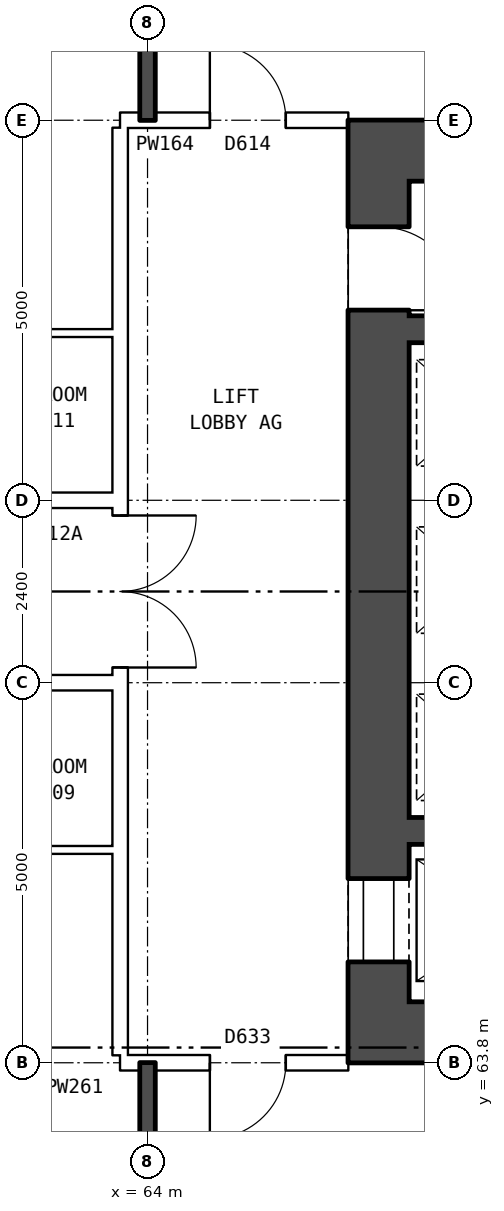
"""IFC4 building model, lengths in metres.
Left out: names, types, materials, properties, quantities, classifications, styles, units other than length and angle.
Written with IfcOpenShell. Run it as: python <this file> out.ifc"""

import sys

from ifc_helpers import new_model, si_unit, direction, frame, frame_2d, origin, place, context, subcontext, project, spatial, rectangle, extrude, element, fill, save


model = new_model("IFC4")
c1 = context("Model", 3, precision=1e-05, world=origin(), true_north=direction((0.0, 1.0)))
c2 = subcontext(c1, "Body", "Model", "MODEL_VIEW")
j1 = project(units=[si_unit("LENGTHUNIT", "METRE"), si_unit("PLANEANGLEUNIT", "RADIAN")], contexts=[c1])
p1 = place(None, origin())
s1 = spatial("IfcSite", under=j1, at=p1, CompositionType="ELEMENT")
p2 = place(p1, origin())
s2 = spatial("IfcBuilding", under=s1, at=p2, CompositionType="ELEMENT")
p3 = place(p2, frame((0.0, 0.0, 47.4)))
s3 = spatial("IfcBuildingStorey", under=s2, at=p3, CompositionType="ELEMENT", Elevation=47.4)
p4 = place(p3, frame((67.04, 64.6, 0.0), z_axis=(0.0, 0.0, 1.0), x_axis=(0.0, 1.0, 0.0)))
e1 = element("IfcWall", 1, at=p4, inside=s3, PredefinedType="SHEAR", context=c2, shape_type="SweptSolid", body=[
    extrude(rectangle(XDim=10.8, YDim=0.8, at=frame_2d((5.4, 0.0))), origin(), (0.0, 0.0, 1.0), 2.85),
])
p5 = place(p4, frame((0.525, 0.0, 0.0)))
e2 = element("IfcOpeningElement", 2, at=p5, cuts=e1, PredefinedType="OPENING", context=c2, shape_type="SweptSolid", body=[
    extrude(rectangle(XDim=1.1, YDim=2.1, at=frame_2d((0.55, 1.05))), frame((0.0, 0.41, 0.0), z_axis=(0.0, -1.0, 0.0), x_axis=(1.0, 0.0, 0.0)), (0.0, 0.0, 1.0), 0.82),
])
p6 = place(p4, frame((9.1, 0.0, 0.0)))
e3 = element("IfcOpeningElement", 3, at=p6, cuts=e1, PredefinedType="OPENING", context=c2, shape_type="SweptSolid", body=[
    extrude(rectangle(XDim=1.1, YDim=2.1, at=frame_2d((0.55, 1.05))), frame((0.0, 0.41, 0.0), z_axis=(0.0, -1.0, 0.0), x_axis=(1.0, 0.0, 0.0)), (0.0, 0.0, 1.0), 0.82),
])
for number, where, z_axis, x_axis in (
    (4, (66.64, 64.2, 0.0), (0.0, 0.0, 1.0), (1.0, 0.0, 0.0)),
    (5, (66.64, 75.8, 0.0), (0.0, 0.0, 1.0), (1.0, 0.0, 0.0)),
):
    element("IfcWall", number, at=place(p3, frame(where, z_axis=z_axis, x_axis=x_axis)), inside=s3, PredefinedType="SHEAR", context=c2, shape_type="SweptSolid", body=[
        extrude(rectangle(XDim=9.0, YDim=0.8, at=frame_2d((4.5, 0.0))), origin(), (0.0, 0.0, 1.0), 2.85),
    ])
p7 = place(p3, frame((67.44, 66.85, 0.0), z_axis=(0.0, 0.0, 1.0), x_axis=(1.0, 0.0, 0.0)))
e6 = element("IfcWall", 6, at=p7, inside=s3, PredefinedType="SHEAR", context=c2, shape_type="SweptSolid", body=[
    extrude(rectangle(XDim=3.245, YDim=0.35, at=frame_2d((1.623, 0.0))), origin(), (0.0, 0.0, 1.0), 2.85),
])
p8 = place(p3, frame((67.44, 73.45, 0.0), z_axis=(0.0, 0.0, 1.0), x_axis=(1.0, 0.0, 0.0)))
e7 = element("IfcWall", 7, at=p8, inside=s3, PredefinedType="SHEAR", context=c2, shape_type="SweptSolid", body=[
    extrude(rectangle(XDim=2.075, YDim=0.35, at=frame_2d((1.038, 0.0))), origin(), (0.0, 0.0, 1.0), 2.85),
])
p9 = place(p3, frame((63.64, 63.9, 0.0), z_axis=(0.0, 0.0, 1.0), x_axis=(0.0, 1.0, 0.0)))
e8 = element("IfcWall", 8, at=p9, inside=s3, PredefinedType="PARTITIONING", context=c2, shape_type="SweptSolid", body=[
    extrude(rectangle(XDim=12.2, YDim=0.2, at=frame_2d((6.1, 0.0))), origin(), (0.0, 0.0, 1.0), 2.85),
])
p10 = place(p9, frame((5.1, 0.0, 0.0)))
e9 = element("IfcOpeningElement", 9, at=p10, cuts=e8, PredefinedType="OPENING", context=c2, shape_type="SweptSolid", body=[
    extrude(rectangle(XDim=2.0, YDim=2.1, at=frame_2d((1.0, 1.05))), frame((0.0, 0.11, 0.0), z_axis=(0.0, -1.0, 0.0), x_axis=(1.0, 0.0, 0.0)), (0.0, 0.0, 1.0), 0.22),
])
p11 = place(p3, frame((63.64, 63.8, 0.0), z_axis=(0.0, 0.0, 1.0), x_axis=(1.0, 0.0, 0.0)))
e10 = element("IfcWall", 10, at=p11, inside=s3, PredefinedType="PARTITIONING", context=c2, shape_type="SweptSolid", body=[
    extrude(rectangle(XDim=3.0, YDim=0.2, at=frame_2d((1.5, 0.0))), origin(), (0.0, 0.0, 1.0), 2.85),
])
p12 = place(p11, frame((1.18, 0.0, 0.0)))
e11 = element("IfcOpeningElement", 11, at=p12, cuts=e10, PredefinedType="OPENING", context=c2, shape_type="SweptSolid", body=[
    extrude(rectangle(XDim=1.0, YDim=2.1, at=frame_2d((0.5, 1.05))), frame((0.0, 0.11, 0.0), z_axis=(0.0, -1.0, 0.0), x_axis=(1.0, 0.0, 0.0)), (0.0, 0.0, 1.0), 0.22),
])
p13 = place(p3, frame((61.0, 66.6, 0.0), z_axis=(0.0, 0.0, 1.0), x_axis=(1.0, 0.0, 0.0)))
e12 = element("IfcWall", 12, at=p13, inside=s3, PredefinedType="PARTITIONING", context=c2, shape_type="SweptSolid", body=[
    extrude(rectangle(XDim=2.64, YDim=0.1, at=frame_2d((1.32, 0.0))), origin(), (0.0, 0.0, 1.0), 2.85),
])
p14 = place(p3, frame((44.36, 68.8, 0.0), z_axis=(0.0, 0.0, 1.0), x_axis=(1.0, 0.0, 0.0)))
e13 = element("IfcWall", 13, at=p14, inside=s3, PredefinedType="PARTITIONING", context=c2, shape_type="SweptSolid", body=[
    extrude(rectangle(XDim=19.28, YDim=0.2, at=frame_2d((9.64, 0.0))), origin(), (0.0, 0.0, 1.0), 2.85),
])
p15 = place(p14, frame((14.64, 0.0, 0.0)))
e14 = element("IfcOpeningElement", 14, at=p15, cuts=e13, PredefinedType="OPENING", context=c2, shape_type="SweptSolid", body=[
    extrude(rectangle(XDim=1.0, YDim=2.1, at=frame_2d((0.5, 1.05))), frame((0.0, 0.11, 0.0), z_axis=(0.0, -1.0, 0.0), x_axis=(1.0, 0.0, 0.0)), (0.0, 0.0, 1.0), 0.22),
])
p16 = place(p14, frame((5.64, 0.0, 0.0)))
e15 = element("IfcOpeningElement", 15, at=p16, cuts=e13, PredefinedType="OPENING", context=c2, shape_type="SweptSolid", body=[
    extrude(rectangle(XDim=1.0, YDim=2.1, at=frame_2d((0.5, 1.05))), frame((0.0, 0.11, 0.0), z_axis=(0.0, -1.0, 0.0), x_axis=(1.0, 0.0, 0.0)), (0.0, 0.0, 1.0), 0.22),
])
p17 = place(p3, frame((44.36, 71.2, 0.0), z_axis=(0.0, 0.0, 1.0), x_axis=(1.0, 0.0, 0.0)))
e16 = element("IfcWall", 16, at=p17, inside=s3, PredefinedType="PARTITIONING", context=c2, shape_type="SweptSolid", body=[
    extrude(rectangle(XDim=19.28, YDim=0.2, at=frame_2d((9.64, 0.0))), origin(), (0.0, 0.0, 1.0), 2.85),
])
p18 = place(p17, frame((14.64, 0.0, 0.0)))
e17 = element("IfcOpeningElement", 17, at=p18, cuts=e16, PredefinedType="OPENING", context=c2, shape_type="SweptSolid", body=[
    extrude(rectangle(XDim=1.0, YDim=2.1, at=frame_2d((0.5, 1.05))), frame((0.0, 0.11, 0.0), z_axis=(0.0, -1.0, 0.0), x_axis=(1.0, 0.0, 0.0)), (0.0, 0.0, 1.0), 0.22),
])
p19 = place(p17, frame((5.64, 0.0, 0.0)))
e18 = element("IfcOpeningElement", 18, at=p19, cuts=e16, PredefinedType="OPENING", context=c2, shape_type="SweptSolid", body=[
    extrude(rectangle(XDim=1.0, YDim=2.1, at=frame_2d((0.5, 1.05))), frame((0.0, 0.11, 0.0), z_axis=(0.0, -1.0, 0.0), x_axis=(1.0, 0.0, 0.0)), (0.0, 0.0, 1.0), 0.22),
])
p20 = place(p3, frame((61.0, 73.4, 0.0), z_axis=(0.0, 0.0, 1.0), x_axis=(1.0, 0.0, 0.0)))
e19 = element("IfcWall", 19, at=p20, inside=s3, PredefinedType="PARTITIONING", context=c2, shape_type="SweptSolid", body=[
    extrude(rectangle(XDim=2.64, YDim=0.1, at=frame_2d((1.32, 0.0))), origin(), (0.0, 0.0, 1.0), 2.85),
])
p21 = place(p3, frame((63.64, 76.2, 0.0), z_axis=(0.0, 0.0, 1.0), x_axis=(1.0, 0.0, 0.0)))
e20 = element("IfcWall", 20, at=p21, inside=s3, PredefinedType="PARTITIONING", context=c2, shape_type="SweptSolid", body=[
    extrude(rectangle(XDim=3.0, YDim=0.2, at=frame_2d((1.5, 0.0))), origin(), (0.0, 0.0, 1.0), 2.85),
])
p22 = place(p21, frame((1.18, 0.0, 0.0)))
e21 = element("IfcOpeningElement", 21, at=p22, cuts=e20, PredefinedType="OPENING", context=c2, shape_type="SweptSolid", body=[
    extrude(rectangle(XDim=1.0, YDim=2.1, at=frame_2d((0.5, 1.05))), frame((0.0, 0.11, 0.0), z_axis=(0.0, -1.0, 0.0), x_axis=(1.0, 0.0, 0.0)), (0.0, 0.0, 1.0), 0.22),
])
for number, where, z_axis, x_axis in (
    (22, (64.0, 54.36, 0.0), (0.0, 0.0, 1.0), (0.0, 1.0, 0.0)),
    (23, (64.0, 76.2, 0.0), (0.0, 0.0, 1.0), (0.0, 1.0, 0.0)),
):
    element("IfcWall", number, at=place(p3, frame(where, z_axis=z_axis, x_axis=x_axis)), inside=s3, PredefinedType="SOLIDWALL", context=c2, shape_type="SweptSolid", body=[
        extrude(rectangle(XDim=9.44, YDim=0.2, at=frame_2d((4.72, 0.0))), origin(), (0.0, 0.0, 1.0), 2.85),
    ])
p23 = place(p5, origin())
e24 = element("IfcDoor", 24, at=p23, inside=s3, OperationType="DOUBLE_DOOR_SLIDING", PredefinedType="DOOR", context=c2, shape_type="SweptSolid", body=[
    extrude(rectangle(XDim=1.1, YDim=2.1, at=frame_2d((0.55, 1.05))), frame((0.0, -0.335, 0.0), z_axis=(0.0, -1.0, 0.0), x_axis=(1.0, 0.0, 0.0)), (0.0, 0.0, 1.0), 0.05),
])
fill(e2, e24)
p24 = place(p6, frame((1.1, 0.0, 0.0), z_axis=(0.0, 0.0, 1.0), x_axis=(-1.0, 0.0, 0.0)))
e25 = element("IfcDoor", 25, at=p24, inside=s3, OperationType="SINGLE_SWING_RIGHT", PredefinedType="DOOR", context=c2, shape_type="SweptSolid", body=[
    extrude(rectangle(XDim=1.1, YDim=2.1, at=frame_2d((0.55, 1.05))), frame((0.0, 0.385, 0.0), z_axis=(0.0, -1.0, 0.0), x_axis=(1.0, 0.0, 0.0)), (0.0, 0.0, 1.0), 0.05),
])
fill(e3, e25)
p25 = place(p10, frame((2.0, 0.0, 0.0), z_axis=(0.0, 0.0, 1.0), x_axis=(-1.0, 0.0, 0.0)))
e26 = element("IfcDoor", 26, at=p25, inside=s3, OperationType="DOUBLE_DOOR_SINGLE_SWING", PredefinedType="DOOR", context=c2, shape_type="SweptSolid", body=[
    extrude(rectangle(XDim=2.0, YDim=2.1, at=frame_2d((1.0, 1.05))), frame((0.0, 0.025, 0.0), z_axis=(0.0, -1.0, 0.0), x_axis=(1.0, 0.0, 0.0)), (0.0, 0.0, 1.0), 0.05),
])
fill(e9, e26)
p26 = place(p12, frame((1.0, 0.0, 0.0), z_axis=(0.0, 0.0, 1.0), x_axis=(-1.0, 0.0, 0.0)))
e27 = element("IfcDoor", 27, at=p26, inside=s3, OperationType="SINGLE_SWING_RIGHT", PredefinedType="DOOR", context=c2, shape_type="SweptSolid", body=[
    extrude(rectangle(XDim=1.0, YDim=2.1, at=frame_2d((0.5, 1.05))), frame((0.0, 0.025, 0.0), z_axis=(0.0, -1.0, 0.0), x_axis=(1.0, 0.0, 0.0)), (0.0, 0.0, 1.0), 0.05),
])
fill(e11, e27)
p27 = place(p22, origin())
e28 = element("IfcDoor", 28, at=p27, inside=s3, OperationType="SINGLE_SWING_LEFT", PredefinedType="DOOR", context=c2, shape_type="SweptSolid", body=[
    extrude(rectangle(XDim=1.0, YDim=2.1, at=frame_2d((0.5, 1.05))), frame((0.0, 0.025, 0.0), z_axis=(0.0, -1.0, 0.0), x_axis=(1.0, 0.0, 0.0)), (0.0, 0.0, 1.0), 0.05),
])
fill(e21, e28)
save(model, sys.argv[1])
